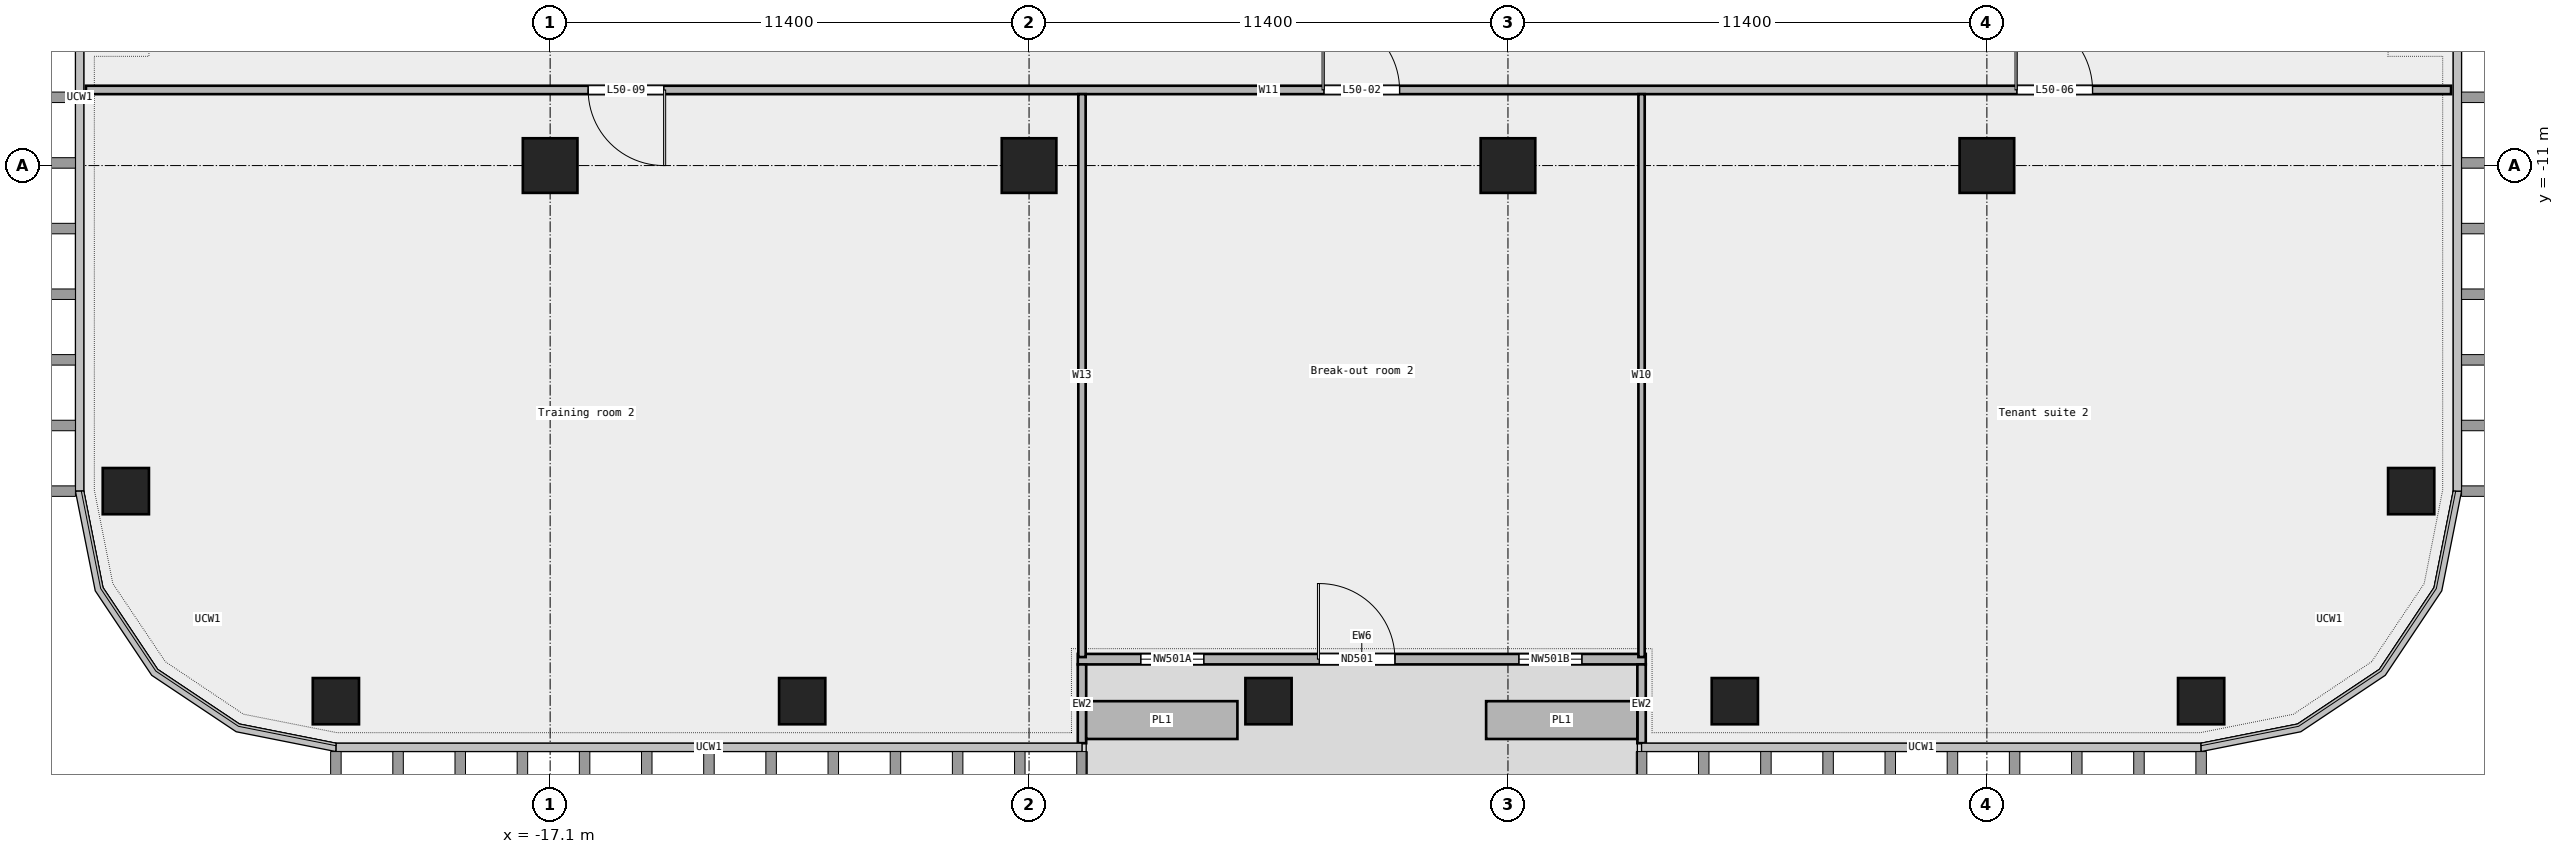
"""IFC4 building model, lengths in metres.
Left out: names, types, materials, properties, quantities, classifications, styles, units other than length and angle.
Written with IfcOpenShell. Run it as: python <this file> out.ifc"""

import sys

from ifc_helpers import new_model, si_unit, direction, frame, frame_2d, origin, origin_2d, place, context, subcontext, project, spatial, rectangle, extrude, element, fill, save


model = new_model("IFC4")
c1 = context("Model", 3, precision=1e-05, world=origin(), true_north=direction((0.0, 1.0)))
c2 = subcontext(c1, "Body", "Model", "MODEL_VIEW")
j1 = project(units=[si_unit("LENGTHUNIT", "METRE"), si_unit("PLANEANGLEUNIT", "RADIAN")], contexts=[c1])
p1 = place(None, origin())
s1 = spatial("IfcSite", under=j1, at=p1, CompositionType="ELEMENT")
p2 = place(p1, origin())
s2 = spatial("IfcBuilding", under=s1, at=p2, CompositionType="ELEMENT")
p3 = place(p2, frame((0.0, 0.0, 235.0)))
s3 = spatial("IfcBuildingStorey", under=s2, at=p3, CompositionType="ELEMENT", Elevation=235.0)
for number, where, z_axis, x_axis in (
    (1, (-22.2, -23.75, 0.0), (0.0, 0.0, 1.0), (1.0, 0.0, 0.0)),
    (2, (-11.1, -23.75, 0.0), (0.0, 0.0, 1.0), (1.0, 0.0, 0.0)),
    (3, (0.0, -23.75, 0.0), (0.0, 0.0, 1.0), (1.0, 0.0, 0.0)),
    (4, (11.1, -23.75, 0.0), (0.0, 0.0, 1.0), (1.0, 0.0, 0.0)),
    (5, (22.2, -23.75, 0.0), (0.0, 0.0, 1.0), (1.0, 0.0, 0.0)),
    (6, (27.2, -18.75, 0.0), (0.0, 0.0, 1.0), (1.0, 0.0, 0.0)),
    (7, (-27.2, -18.75, 0.0), (0.0, 0.0, 1.0), (1.0, 0.0, 0.0)),
):
    element("IfcColumn", number, at=place(p3, frame(where, z_axis=z_axis, x_axis=x_axis)), inside=s3, PredefinedType="COLUMN", context=c2, shape_type="SweptSolid", body=[
        extrude(rectangle(XDim=1.1, YDim=1.1, at=origin_2d()), origin(), (0.0, 0.0, 1.0), 3.6),
    ])
for number, where, z_axis, x_axis in (
    (8, (-17.1, -11.0, 0.0), (0.0, 0.0, 1.0), (1.0, 0.0, 0.0)),
    (9, (-5.7, -11.0, 0.0), (0.0, 0.0, 1.0), (1.0, 0.0, 0.0)),
    (10, (5.7, -11.0, 0.0), (0.0, 0.0, 1.0), (1.0, 0.0, 0.0)),
    (11, (17.1, -11.0, 0.0), (0.0, 0.0, 1.0), (1.0, 0.0, 0.0)),
):
    element("IfcColumn", number, at=place(p3, frame(where, z_axis=z_axis, x_axis=x_axis)), inside=s3, PredefinedType="COLUMN", context=c2, shape_type="SweptSolid", body=[
        extrude(rectangle(XDim=1.3, YDim=1.3, at=origin_2d()), origin(), (0.0, 0.0, 1.0), 3.6),
    ])
p4 = place(p3, frame((-4.54, -22.75, 0.0), z_axis=(0.0, 0.0, 1.0), x_axis=(1.0, 0.0, 0.0)))
e12 = element("IfcWall", 12, at=p4, inside=s3, PredefinedType="STANDARD", context=c2, shape_type="SweptSolid", body=[
    extrude(rectangle(XDim=13.52, YDim=0.25, at=frame_2d((6.76, 0.0))), origin(), (0.0, 0.0, 1.0), 3.6),
])
p5 = place(p4, frame((1.5, 0.0, 0.45)))
e13 = element("IfcOpeningElement", 13, at=p5, cuts=e12, PredefinedType="OPENING", context=c2, shape_type="SweptSolid", body=[
    extrude(rectangle(XDim=1.5, YDim=2.4, at=frame_2d((0.75, 1.2))), frame((0.0, 0.137, 0.0), z_axis=(0.0, -1.0, 0.0), x_axis=(1.0, 0.0, 0.0)), (0.0, 0.0, 1.0), 0.274),
])
p6 = place(p4, frame((5.75, 0.0, 0.0)))
e14 = element("IfcOpeningElement", 14, at=p6, cuts=e12, PredefinedType="OPENING", context=c2, shape_type="SweptSolid", body=[
    extrude(rectangle(XDim=1.8, YDim=2.4, at=frame_2d((0.9, 1.2))), frame((0.0, 0.137, 0.0), z_axis=(0.0, -1.0, 0.0), x_axis=(1.0, 0.0, 0.0)), (0.0, 0.0, 1.0), 0.274),
])
p7 = place(p4, frame((10.5, 0.0, 0.45)))
e15 = element("IfcOpeningElement", 15, at=p7, cuts=e12, PredefinedType="OPENING", context=c2, shape_type="SweptSolid", body=[
    extrude(rectangle(XDim=1.5, YDim=2.4, at=frame_2d((0.75, 1.2))), frame((0.0, 0.137, 0.0), z_axis=(0.0, -1.0, 0.0), x_axis=(1.0, 0.0, 0.0)), (0.0, 0.0, 1.0), 0.274),
])
for number, where, z_axis, x_axis in (
    (16, (-4.44, -24.75, 0.0), (0.0, 0.0, 1.0), (0.0, 1.0, 0.0)),
    (17, (8.88, -24.75, 0.0), (0.0, 0.0, 1.0), (0.0, 1.0, 0.0)),
):
    element("IfcWall", number, at=place(p3, frame(where, z_axis=z_axis, x_axis=x_axis)), inside=s3, PredefinedType="STANDARD", context=c2, shape_type="SweptSolid", body=[
        extrude(rectangle(XDim=1.875, YDim=0.2, at=frame_2d((0.938, 0.0))), origin(), (0.0, 0.0, 1.0), 3.6),
    ])
for number, where, z_axis, x_axis in (
    (18, (-4.34, -24.2, 0.0), (0.0, 0.0, 1.0), (1.0, 0.0, 0.0)),
    (19, (5.18, -24.2, 0.0), (0.0, 0.0, 1.0), (1.0, 0.0, 0.0)),
):
    element("IfcWall", number, at=place(p3, frame(where, z_axis=z_axis, x_axis=x_axis)), inside=s3, PredefinedType="STANDARD", context=c2, shape_type="SweptSolid", body=[
        extrude(rectangle(XDim=3.6, YDim=0.9, at=frame_2d((1.8, 0.0))), origin(), (0.0, 0.0, 1.0), 0.7),
    ])
p8 = place(p3, frame((-28.15, -9.2, 0.0), z_axis=(0.0, 0.0, 1.0), x_axis=(1.0, 0.0, 0.0)))
e20 = element("IfcWall", 20, at=p8, inside=s3, PredefinedType="PARTITIONING", context=c2, shape_type="SweptSolid", body=[
    extrude(rectangle(XDim=56.3, YDim=0.2, at=frame_2d((28.15, 0.0))), origin(), (0.0, 0.0, 1.0), 3.6),
])
p9 = place(p8, frame((29.47, 0.0, 0.0)))
e21 = element("IfcOpeningElement", 21, at=p9, cuts=e20, PredefinedType="OPENING", context=c2, shape_type="SweptSolid", body=[
    extrude(rectangle(XDim=1.8, YDim=2.1, at=frame_2d((0.9, 1.05))), frame((0.0, 0.112, 0.0), z_axis=(0.0, -1.0, 0.0), x_axis=(1.0, 0.0, 0.0)), (0.0, 0.0, 1.0), 0.224),
])
p10 = place(p8, frame((45.965, 0.0, 0.0)))
e22 = element("IfcOpeningElement", 22, at=p10, cuts=e20, PredefinedType="OPENING", context=c2, shape_type="SweptSolid", body=[
    extrude(rectangle(XDim=1.8, YDim=2.1, at=frame_2d((0.9, 1.05))), frame((0.0, 0.112, 0.0), z_axis=(0.0, -1.0, 0.0), x_axis=(1.0, 0.0, 0.0)), (0.0, 0.0, 1.0), 0.224),
])
p11 = place(p8, frame((11.955, 0.0, 0.0)))
e23 = element("IfcOpeningElement", 23, at=p11, cuts=e20, PredefinedType="OPENING", context=c2, shape_type="SweptSolid", body=[
    extrude(rectangle(XDim=1.8, YDim=2.1, at=frame_2d((0.9, 1.05))), frame((0.0, 0.112, 0.0), z_axis=(0.0, -1.0, 0.0), x_axis=(1.0, 0.0, 0.0)), (0.0, 0.0, 1.0), 0.224),
])
p12 = place(p3, frame((-4.44, -22.7, 0.0), z_axis=(0.0, 0.0, 1.0), x_axis=(0.0, 1.0, 0.0)))
e24 = element("IfcWall", 24, at=p12, inside=s3, PredefinedType="PARTITIONING", context=c2, shape_type="SweptSolid", body=[
    extrude(rectangle(XDim=13.4, YDim=0.175, at=frame_2d((6.7, 0.0))), origin(), (0.0, 0.0, 1.0), 3.6),
])
p13 = place(p3, frame((8.88, -22.7, 0.0), z_axis=(0.0, 0.0, 1.0), x_axis=(0.0, 1.0, 0.0)))
e25 = element("IfcWall", 25, at=p13, inside=s3, PredefinedType="PARTITIONING", context=c2, shape_type="SweptSolid", body=[
    extrude(rectangle(XDim=13.4, YDim=0.15, at=frame_2d((6.7, 0.0))), origin(), (0.0, 0.0, 1.0), 3.6),
])
p14 = place(p5, origin())
e26 = element("IfcWindow", 26, at=p14, inside=s3, PartitioningType="SINGLE_PANEL", PredefinedType="WINDOW", context=c2, shape_type="SweptSolid", body=[
    extrude(rectangle(XDim=1.5, YDim=2.4, at=frame_2d((0.75, 1.2))), frame((0.0, 0.03, 0.0), z_axis=(0.0, -1.0, 0.0), x_axis=(1.0, 0.0, 0.0)), (0.0, 0.0, 1.0), 0.06),
])
fill(e13, e26)
p15 = place(p6, origin())
e27 = element("IfcDoor", 27, at=p15, inside=s3, OperationType="DOUBLE_DOOR_SINGLE_SWING", PredefinedType="DOOR", context=c2, shape_type="SweptSolid", body=[
    extrude(rectangle(XDim=1.8, YDim=2.4, at=frame_2d((0.9, 1.2))), frame((0.0, 0.025, 0.0), z_axis=(0.0, -1.0, 0.0), x_axis=(1.0, 0.0, 0.0)), (0.0, 0.0, 1.0), 0.05),
])
fill(e14, e27)
p16 = place(p7, origin())
e28 = element("IfcWindow", 28, at=p16, inside=s3, PartitioningType="SINGLE_PANEL", PredefinedType="WINDOW", context=c2, shape_type="SweptSolid", body=[
    extrude(rectangle(XDim=1.5, YDim=2.4, at=frame_2d((0.75, 1.2))), frame((0.0, 0.03, 0.0), z_axis=(0.0, -1.0, 0.0), x_axis=(1.0, 0.0, 0.0)), (0.0, 0.0, 1.0), 0.06),
])
fill(e15, e28)
p17 = place(p9, origin())
e29 = element("IfcDoor", 29, at=p17, inside=s3, OperationType="DOUBLE_DOOR_SINGLE_SWING", PredefinedType="DOOR", context=c2, shape_type="SweptSolid", body=[
    extrude(rectangle(XDim=1.8, YDim=2.1, at=frame_2d((0.9, 1.05))), frame((0.0, 0.025, 0.0), z_axis=(0.0, -1.0, 0.0), x_axis=(1.0, 0.0, 0.0)), (0.0, 0.0, 1.0), 0.05),
])
fill(e21, e29)
p18 = place(p10, origin())
e30 = element("IfcDoor", 30, at=p18, inside=s3, OperationType="DOUBLE_DOOR_SINGLE_SWING", PredefinedType="DOOR", context=c2, shape_type="SweptSolid", body=[
    extrude(rectangle(XDim=1.8, YDim=2.1, at=frame_2d((0.9, 1.05))), frame((0.0, 0.025, 0.0), z_axis=(0.0, -1.0, 0.0), x_axis=(1.0, 0.0, 0.0)), (0.0, 0.0, 1.0), 0.05),
])
fill(e22, e30)
p19 = place(p11, origin())
e31 = element("IfcDoor", 31, at=p19, inside=s3, OperationType="DOUBLE_DOOR_SINGLE_SWING", PredefinedType="DOOR", context=c2, shape_type="SweptSolid", body=[
    extrude(rectangle(XDim=1.8, YDim=2.1, at=frame_2d((0.9, 1.05))), frame((0.0, 0.025, 0.0), z_axis=(0.0, -1.0, 0.0), x_axis=(1.0, 0.0, 0.0)), (0.0, 0.0, 1.0), 0.05),
])
fill(e23, e31)
save(model, sys.argv[1])
